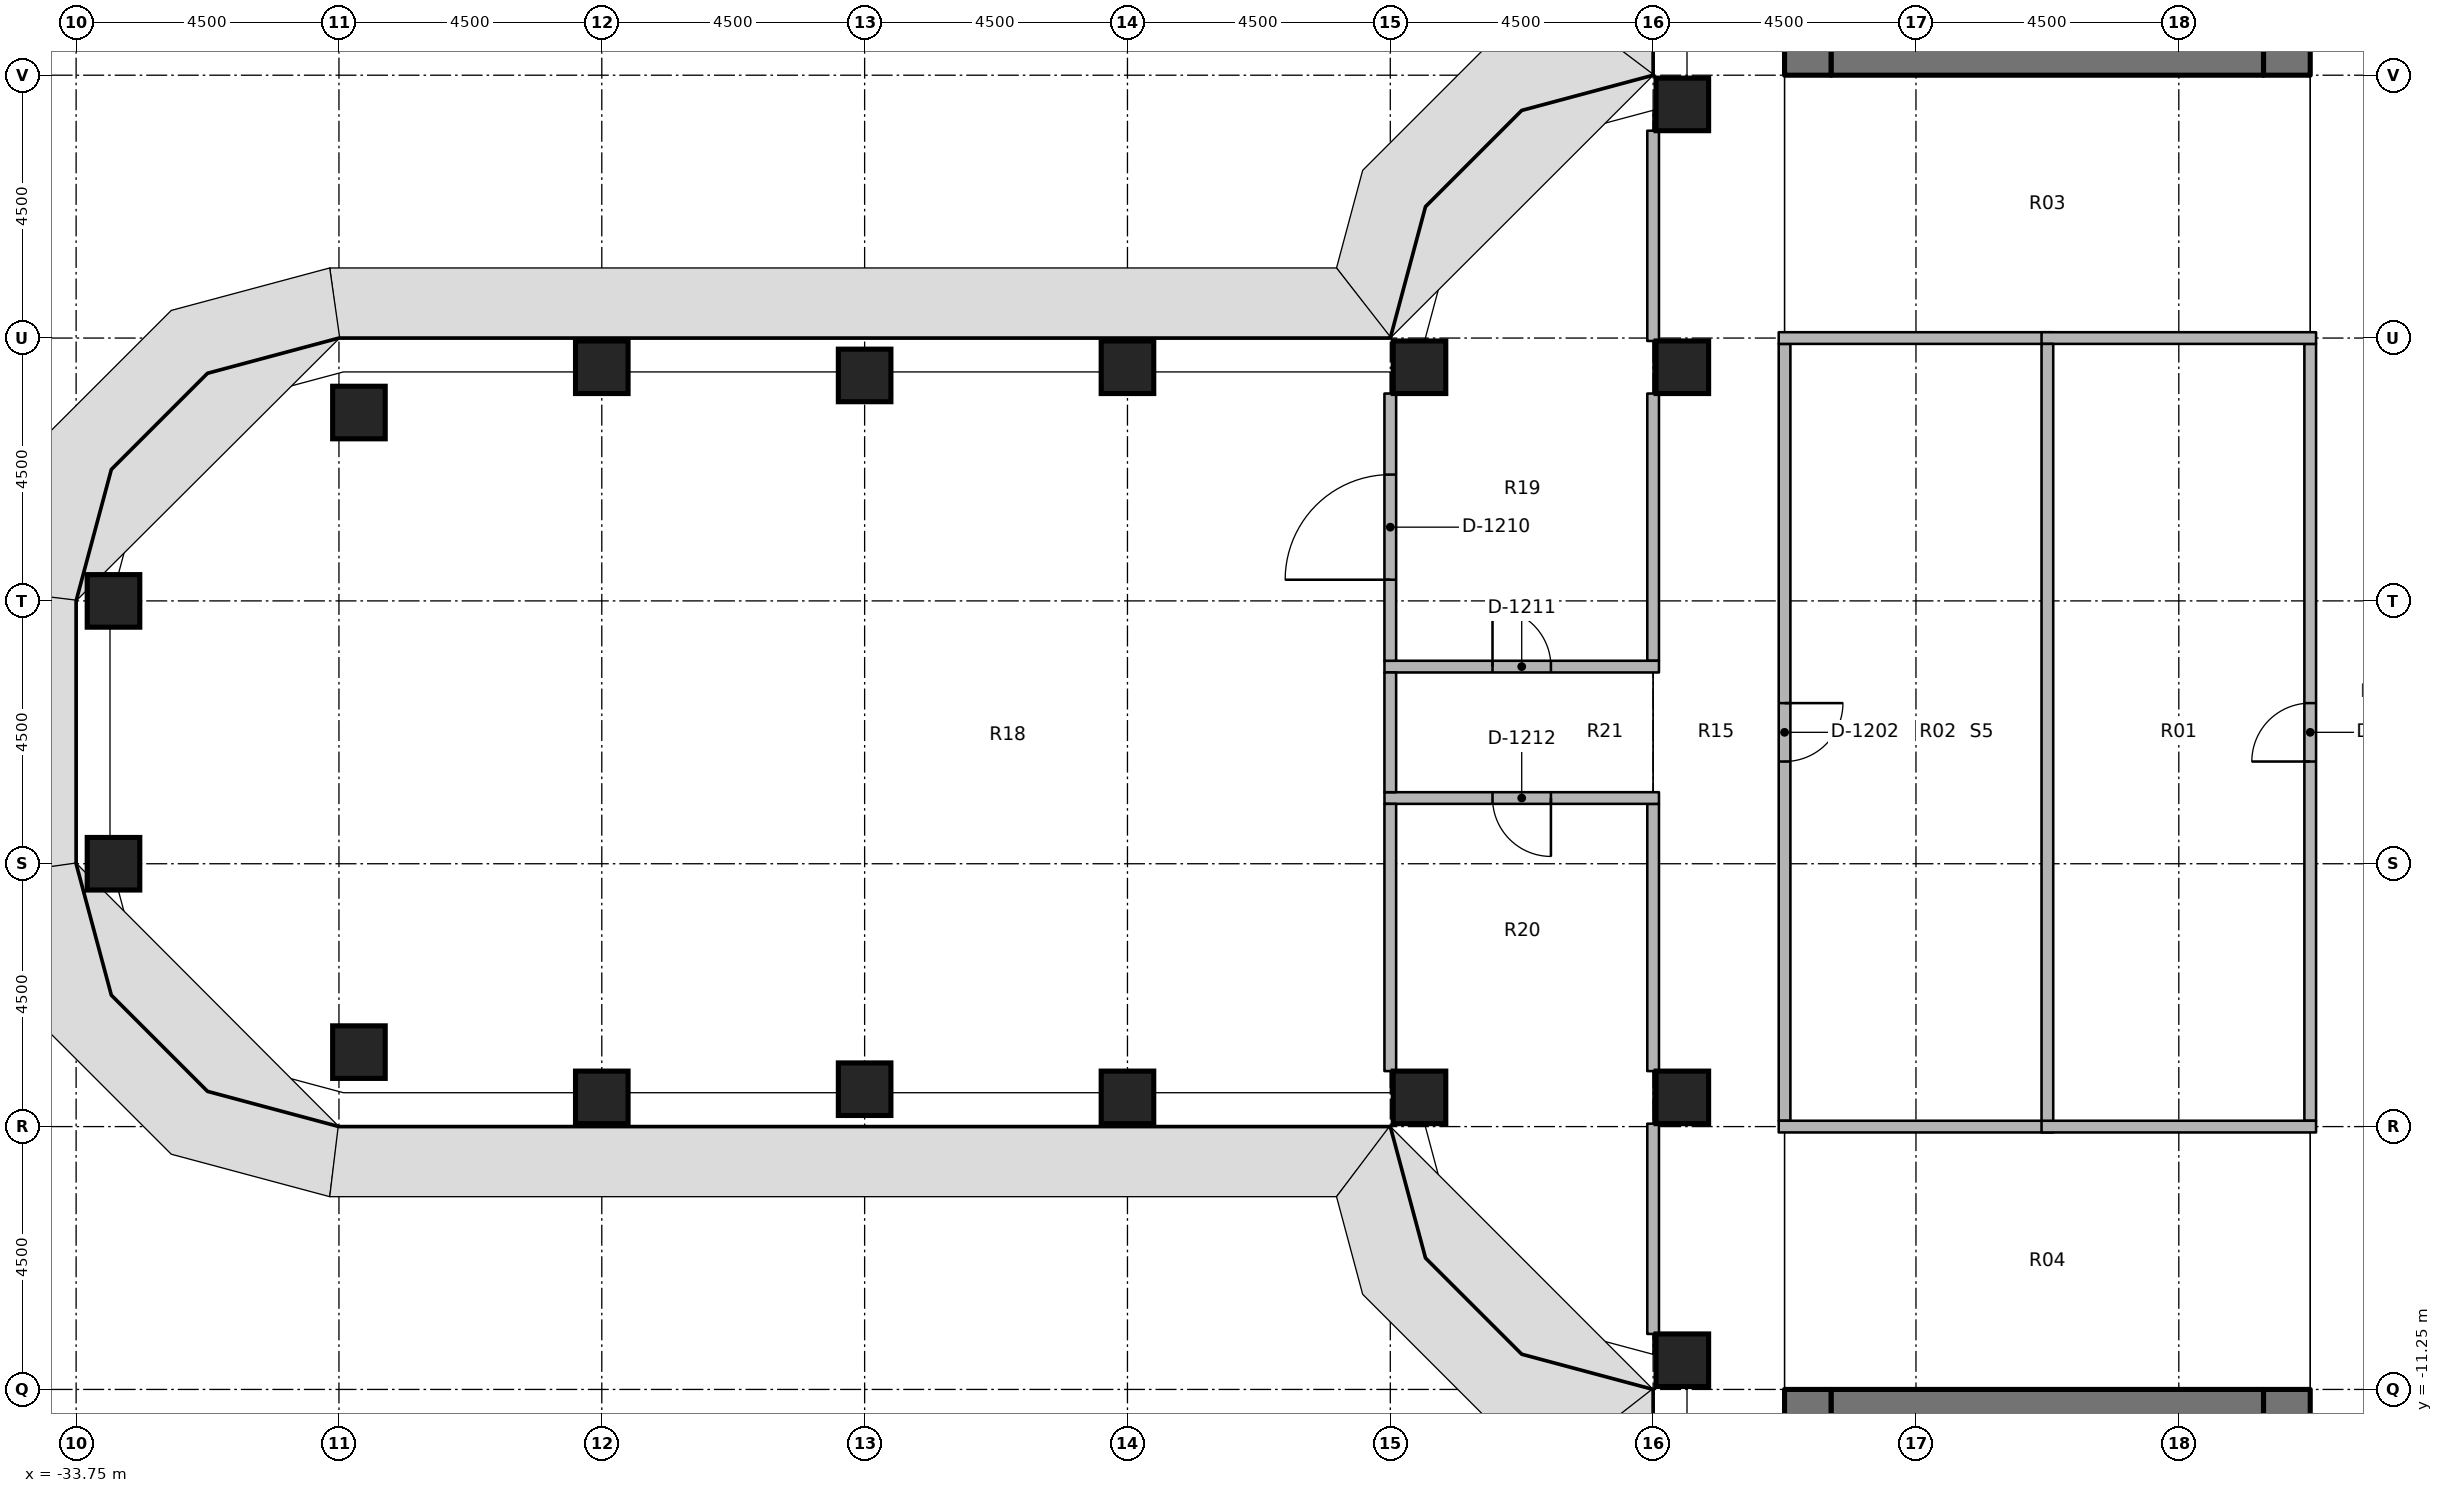
"""IFC4 building model, lengths in metres.
Left out: names, types, materials, properties, quantities, classifications, styles, units other than length and angle.
Written with IfcOpenShell. Run it as: python <this file> out.ifc"""

import sys

from ifc_helpers import new_model, si_unit, direction, frame, frame_2d, origin, origin_2d, place, context, subcontext, project, spatial, rectangle, extrude, element, fill, save


model = new_model("IFC4")
c1 = context("Model", 3, precision=1e-05, world=origin(), true_north=direction((0.0, 1.0)))
c2 = subcontext(c1, "Body", "Model", "MODEL_VIEW")
j1 = project(units=[si_unit("LENGTHUNIT", "METRE"), si_unit("PLANEANGLEUNIT", "RADIAN")], contexts=[c1])
p1 = place(None, origin())
s1 = spatial("IfcSite", under=j1, at=p1, CompositionType="ELEMENT")
p2 = place(p1, origin())
s2 = spatial("IfcBuilding", under=s1, at=p2, CompositionType="ELEMENT")
p3 = place(p2, frame((0.0, 0.0, 128.4)))
s3 = spatial("IfcBuildingStorey", under=s2, at=p3, CompositionType="ELEMENT", Elevation=128.4)
for number, where, z_axis, x_axis in (
    (1, (-33.11, -2.25, 0.0), (0.0, 0.0, 1.0), (1.0, 0.0, 0.0)),
    (2, (-33.11, 2.25, 0.0), (0.0, 0.0, 1.0), (1.0, 0.0, 0.0)),
    (3, (-28.908, -5.475, 0.0), (0.0, 0.0, 1.0), (1.0, 0.0, 0.0)),
    (4, (-28.908, 5.475, 0.0), (0.0, 0.0, 1.0), (1.0, 0.0, 0.0)),
    (5, (-24.75, -6.25, 0.0), (0.0, 0.0, 1.0), (1.0, 0.0, 0.0)),
    (6, (-24.75, 6.25, 0.0), (0.0, 0.0, 1.0), (1.0, 0.0, 0.0)),
    (7, (-20.25, -6.11, 0.0), (0.0, 0.0, 1.0), (1.0, 0.0, 0.0)),
    (8, (-20.25, 6.11, 0.0), (0.0, 0.0, 1.0), (1.0, 0.0, 0.0)),
    (9, (-15.75, -6.25, 0.0), (0.0, 0.0, 1.0), (1.0, 0.0, 0.0)),
    (10, (-15.75, 6.25, 0.0), (0.0, 0.0, 1.0), (1.0, 0.0, 0.0)),
    (11, (-10.75, -6.25, 0.0), (0.0, 0.0, 1.0), (1.0, 0.0, 0.0)),
    (12, (-10.75, 6.25, 0.0), (0.0, 0.0, 1.0), (1.0, 0.0, 0.0)),
    (13, (-6.25, -10.75, 0.0), (0.0, 0.0, 1.0), (1.0, 0.0, 0.0)),
    (14, (-6.25, -6.25, 0.0), (0.0, 0.0, 1.0), (1.0, 0.0, 0.0)),
    (15, (-6.25, 6.25, 0.0), (0.0, 0.0, 1.0), (1.0, 0.0, 0.0)),
    (16, (-6.25, 10.75, 0.0), (0.0, 0.0, 1.0), (1.0, 0.0, 0.0)),
):
    element("IfcColumn", number, at=place(p3, frame(where, z_axis=z_axis, x_axis=x_axis)), inside=s3, PredefinedType="COLUMN", context=c2, shape_type="SweptSolid", body=[
        extrude(rectangle(XDim=0.9, YDim=0.9, at=origin_2d()), origin(), (0.0, 0.0, 1.0), 3.65),
    ])
p4 = place(p3, frame((-4.1, 11.25, 0.0), z_axis=(0.0, 0.0, 1.0), x_axis=(0.0, 1.0, 0.0)))
e17 = element("IfcWall", 17, at=p4, inside=s3, PredefinedType="SHEAR", context=c2, shape_type="SweptSolid", body=[
    extrude(rectangle(XDim=15.0, YDim=0.8, at=frame_2d((7.5, 0.0))), origin(), (0.0, 0.0, 1.0), 3.8),
])
p5 = place(p4, frame((7.15, 0.0, 0.0)))
e18 = element("IfcOpeningElement", 18, at=p5, cuts=e17, PredefinedType="OPENING", context=c2, shape_type="SweptSolid", body=[
    extrude(rectangle(XDim=1.5, YDim=2.3, at=frame_2d((0.75, 1.15))), frame((0.0, 0.41, 0.0), z_axis=(0.0, -1.0, 0.0), x_axis=(1.0, 0.0, 0.0)), (0.0, 0.0, 1.0), 0.82),
])
p6 = place(p4, frame((13.9, 0.0, 0.0)))
e19 = element("IfcOpeningElement", 19, at=p6, cuts=e17, PredefinedType="OPENING", context=c2, shape_type="SweptSolid", body=[
    extrude(rectangle(XDim=0.9, YDim=2.1, at=frame_2d((0.45, 1.05))), frame((0.0, 0.41, 0.0), z_axis=(0.0, -1.0, 0.0), x_axis=(1.0, 0.0, 0.0)), (0.0, 0.0, 1.0), 0.82),
])
p7 = place(p4, frame((1.15, 0.0, 0.0)))
e20 = element("IfcOpeningElement", 20, at=p7, cuts=e17, PredefinedType="OPENING", context=c2, shape_type="SweptSolid", body=[
    extrude(rectangle(XDim=1.2, YDim=2.1, at=frame_2d((0.6, 1.05))), frame((0.0, 0.41, 0.0), z_axis=(0.0, -1.0, 0.0), x_axis=(1.0, 0.0, 0.0)), (0.0, 0.0, 1.0), 0.82),
])
p8 = place(p3, frame((4.1, 11.25, 0.0), z_axis=(0.0, 0.0, 1.0), x_axis=(0.0, 1.0, 0.0)))
e21 = element("IfcWall", 21, at=p8, inside=s3, PredefinedType="SHEAR", context=c2, shape_type="SweptSolid", body=[
    extrude(rectangle(XDim=15.0, YDim=0.8, at=frame_2d((7.5, 0.0))), origin(), (0.0, 0.0, 1.0), 3.8),
])
p9 = place(p8, frame((7.15, 0.0, 0.0)))
e22 = element("IfcOpeningElement", 22, at=p9, cuts=e21, PredefinedType="OPENING", context=c2, shape_type="SweptSolid", body=[
    extrude(rectangle(XDim=1.5, YDim=2.3, at=frame_2d((0.75, 1.15))), frame((0.0, 0.41, 0.0), z_axis=(0.0, -1.0, 0.0), x_axis=(1.0, 0.0, 0.0)), (0.0, 0.0, 1.0), 0.82),
])
p10 = place(p8, frame((5.55, 0.0, 0.0)))
e23 = element("IfcOpeningElement", 23, at=p10, cuts=e21, PredefinedType="OPENING", context=c2, shape_type="SweptSolid", body=[
    extrude(rectangle(XDim=1.2, YDim=2.1, at=frame_2d((0.6, 1.05))), frame((0.0, 0.41, 0.0), z_axis=(0.0, -1.0, 0.0), x_axis=(1.0, 0.0, 0.0)), (0.0, 0.0, 1.0), 0.82),
])
p11 = place(p3, frame((-3.7, 11.65, 0.0), z_axis=(0.0, 0.0, 1.0), x_axis=(1.0, 0.0, 0.0)))
e24 = element("IfcWall", 24, at=p11, inside=s3, PredefinedType="SHEAR", context=c2, shape_type="SweptSolid", body=[
    extrude(rectangle(XDim=7.4, YDim=0.8, at=frame_2d((3.7, 0.0))), origin(), (0.0, 0.0, 1.0), 3.8),
])
p12 = place(p3, frame((-4.1, -11.25, 0.0), z_axis=(0.0, 0.0, 1.0), x_axis=(0.0, -1.0, 0.0)))
e25 = element("IfcWall", 25, at=p12, inside=s3, PredefinedType="SHEAR", context=c2, shape_type="SweptSolid", body=[
    extrude(rectangle(XDim=15.0, YDim=0.8, at=frame_2d((7.5, 0.0))), origin(), (0.0, 0.0, 1.0), 3.8),
])
p13 = place(p12, frame((7.15, 0.0, 0.0)))
e26 = element("IfcOpeningElement", 26, at=p13, cuts=e25, PredefinedType="OPENING", context=c2, shape_type="SweptSolid", body=[
    extrude(rectangle(XDim=1.5, YDim=2.3, at=frame_2d((0.75, 1.15))), frame((0.0, 0.41, 0.0), z_axis=(0.0, -1.0, 0.0), x_axis=(1.0, 0.0, 0.0)), (0.0, 0.0, 1.0), 0.82),
])
p14 = place(p12, frame((5.55, 0.0, 0.0)))
e27 = element("IfcOpeningElement", 27, at=p14, cuts=e25, PredefinedType="OPENING", context=c2, shape_type="SweptSolid", body=[
    extrude(rectangle(XDim=1.2, YDim=2.1, at=frame_2d((0.6, 1.05))), frame((0.0, 0.41, 0.0), z_axis=(0.0, -1.0, 0.0), x_axis=(1.0, 0.0, 0.0)), (0.0, 0.0, 1.0), 0.82),
])
p15 = place(p3, frame((4.1, -11.25, 0.0), z_axis=(0.0, 0.0, 1.0), x_axis=(0.0, -1.0, 0.0)))
e28 = element("IfcWall", 28, at=p15, inside=s3, PredefinedType="SHEAR", context=c2, shape_type="SweptSolid", body=[
    extrude(rectangle(XDim=15.0, YDim=0.8, at=frame_2d((7.5, 0.0))), origin(), (0.0, 0.0, 1.0), 3.8),
])
p16 = place(p15, frame((7.15, 0.0, 0.0)))
e29 = element("IfcOpeningElement", 29, at=p16, cuts=e28, PredefinedType="OPENING", context=c2, shape_type="SweptSolid", body=[
    extrude(rectangle(XDim=1.5, YDim=2.3, at=frame_2d((0.75, 1.15))), frame((0.0, 0.41, 0.0), z_axis=(0.0, -1.0, 0.0), x_axis=(1.0, 0.0, 0.0)), (0.0, 0.0, 1.0), 0.82),
])
p17 = place(p15, frame((13.9, 0.0, 0.0)))
e30 = element("IfcOpeningElement", 30, at=p17, cuts=e28, PredefinedType="OPENING", context=c2, shape_type="SweptSolid", body=[
    extrude(rectangle(XDim=0.9, YDim=2.1, at=frame_2d((0.45, 1.05))), frame((0.0, 0.41, 0.0), z_axis=(0.0, -1.0, 0.0), x_axis=(1.0, 0.0, 0.0)), (0.0, 0.0, 1.0), 0.82),
])
p18 = place(p15, frame((1.15, 0.0, 0.0)))
e31 = element("IfcOpeningElement", 31, at=p18, cuts=e28, PredefinedType="OPENING", context=c2, shape_type="SweptSolid", body=[
    extrude(rectangle(XDim=1.2, YDim=2.1, at=frame_2d((0.6, 1.05))), frame((0.0, 0.41, 0.0), z_axis=(0.0, -1.0, 0.0), x_axis=(1.0, 0.0, 0.0)), (0.0, 0.0, 1.0), 0.82),
])
p19 = place(p3, frame((-3.7, -11.65, 0.0), z_axis=(0.0, 0.0, 1.0), x_axis=(1.0, 0.0, 0.0)))
e32 = element("IfcWall", 32, at=p19, inside=s3, PredefinedType="SHEAR", context=c2, shape_type="SweptSolid", body=[
    extrude(rectangle(XDim=7.4, YDim=0.8, at=frame_2d((3.7, 0.0))), origin(), (0.0, 0.0, 1.0), 3.8),
])
p20 = place(p3, frame((-4.5, 6.65, 0.0), z_axis=(0.0, 0.0, 1.0), x_axis=(0.0, -1.0, 0.0)))
e33 = element("IfcWall", 33, at=p20, inside=s3, PredefinedType="PARTITIONING", context=c2, shape_type="SweptSolid", body=[
    extrude(rectangle(XDim=13.3, YDim=0.2, at=frame_2d((6.65, 0.0))), origin(), (0.0, 0.0, 1.0), 2.738),
])
p21 = place(p20, frame((6.15, 0.0, 0.0)))
e34 = element("IfcOpeningElement", 34, at=p21, cuts=e33, PredefinedType="OPENING", context=c2, shape_type="SweptSolid", body=[
    extrude(rectangle(XDim=1.0, YDim=2.1, at=frame_2d((0.5, 1.05))), frame((0.0, 0.11, 0.0), z_axis=(0.0, -1.0, 0.0), x_axis=(1.0, 0.0, 0.0)), (0.0, 0.0, 1.0), 0.22),
])
p22 = place(p3, frame((-6.75, 1.225, 0.0), z_axis=(0.0, 0.0, 1.0), x_axis=(0.0, 1.0, 0.0)))
e35 = element("IfcWall", 35, at=p22, inside=s3, PredefinedType="PARTITIONING", context=c2, shape_type="SweptSolid", body=[
    extrude(rectangle(XDim=4.575, YDim=0.2, at=frame_2d((2.288, 0.0))), origin(), (0.0, 0.0, 1.0), 2.738),
])
for number, where, z_axis, x_axis in (
    (36, (-6.75, 6.7, 0.0), (0.0, 0.0, 1.0), (0.0, 1.0, 0.0)),
    (37, (-6.75, -10.3, 0.0), (0.0, 0.0, 1.0), (0.0, 1.0, 0.0)),
):
    element("IfcWall", number, at=place(p3, frame(where, z_axis=z_axis, x_axis=x_axis)), inside=s3, PredefinedType="PARTITIONING", context=c2, shape_type="SweptSolid", body=[
        extrude(rectangle(XDim=3.6, YDim=0.2, at=frame_2d((1.8, 0.0))), origin(), (0.0, 0.0, 1.0), 2.738),
    ])
p23 = place(p3, frame((-6.75, -5.8, 0.0), z_axis=(0.0, 0.0, 1.0), x_axis=(0.0, 1.0, 0.0)))
e38 = element("IfcWall", 38, at=p23, inside=s3, PredefinedType="PARTITIONING", context=c2, shape_type="SweptSolid", body=[
    extrude(rectangle(XDim=4.575, YDim=0.2, at=frame_2d((2.288, 0.0))), origin(), (0.0, 0.0, 1.0), 2.738),
])
p24 = place(p3, frame((4.5, -6.65, 0.0), z_axis=(0.0, 0.0, 1.0), x_axis=(0.0, 1.0, 0.0)))
e39 = element("IfcWall", 39, at=p24, inside=s3, PredefinedType="PARTITIONING", context=c2, shape_type="SweptSolid", body=[
    extrude(rectangle(XDim=13.3, YDim=0.2, at=frame_2d((6.65, 0.0))), origin(), (0.0, 0.0, 1.0), 2.738),
])
p25 = place(p24, frame((6.15, 0.0, 0.0)))
e40 = element("IfcOpeningElement", 40, at=p25, cuts=e39, PredefinedType="OPENING", context=c2, shape_type="SweptSolid", body=[
    extrude(rectangle(XDim=1.0, YDim=2.1, at=frame_2d((0.5, 1.05))), frame((0.0, 0.11, 0.0), z_axis=(0.0, -1.0, 0.0), x_axis=(1.0, 0.0, 0.0)), (0.0, 0.0, 1.0), 0.22),
])
for number, where, z_axis, x_axis in (
    (41, (-4.6, 6.75, 0.0), (0.0, 0.0, 1.0), (1.0, 0.0, 0.0)),
    (42, (-0.1, 6.75, 0.0), (0.0, 0.0, 1.0), (1.0, 0.0, 0.0)),
    (43, (-4.6, -6.75, 0.0), (0.0, 0.0, 1.0), (1.0, 0.0, 0.0)),
    (44, (-0.1, -6.75, 0.0), (0.0, 0.0, 1.0), (1.0, 0.0, 0.0)),
):
    element("IfcWall", number, at=place(p3, frame(where, z_axis=z_axis, x_axis=x_axis)), inside=s3, PredefinedType="PARTITIONING", context=c2, shape_type="SweptSolid", body=[
        extrude(rectangle(XDim=4.7, YDim=0.2, at=frame_2d((2.35, 0.0))), origin(), (0.0, 0.0, 1.0), 2.738),
    ])
p26 = place(p3, frame((0.0, -6.65, 0.0), z_axis=(0.0, 0.0, 1.0), x_axis=(0.0, 1.0, 0.0)))
e45 = element("IfcWall", 45, at=p26, inside=s3, PredefinedType="PARTITIONING", context=c2, shape_type="SweptSolid", body=[
    extrude(rectangle(XDim=13.3, YDim=0.2, at=frame_2d((6.65, 0.0))), origin(), (0.0, 0.0, 1.0), 2.738),
])
p27 = place(p3, frame((-11.35, 1.125, 0.0), z_axis=(0.0, 0.0, 1.0), x_axis=(1.0, 0.0, 0.0)))
e46 = element("IfcWall", 46, at=p27, inside=s3, PredefinedType="PARTITIONING", context=c2, shape_type="SweptSolid", body=[
    extrude(rectangle(XDim=4.7, YDim=0.2, at=frame_2d((2.35, 0.0))), origin(), (0.0, 0.0, 1.0), 2.738),
])
p28 = place(p27, frame((1.85, 0.0, 0.0)))
e47 = element("IfcOpeningElement", 47, at=p28, cuts=e46, PredefinedType="OPENING", context=c2, shape_type="SweptSolid", body=[
    extrude(rectangle(XDim=1.0, YDim=2.1, at=frame_2d((0.5, 1.05))), frame((0.0, 0.11, 0.0), z_axis=(0.0, -1.0, 0.0), x_axis=(1.0, 0.0, 0.0)), (0.0, 0.0, 1.0), 0.22),
])
p29 = place(p3, frame((-6.65, -1.125, 0.0), z_axis=(0.0, 0.0, 1.0), x_axis=(-1.0, 0.0, 0.0)))
e48 = element("IfcWall", 48, at=p29, inside=s3, PredefinedType="PARTITIONING", context=c2, shape_type="SweptSolid", body=[
    extrude(rectangle(XDim=4.7, YDim=0.2, at=frame_2d((2.35, 0.0))), origin(), (0.0, 0.0, 1.0), 2.738),
])
p30 = place(p29, frame((1.85, 0.0, 0.0)))
e49 = element("IfcOpeningElement", 49, at=p30, cuts=e48, PredefinedType="OPENING", context=c2, shape_type="SweptSolid", body=[
    extrude(rectangle(XDim=1.0, YDim=2.1, at=frame_2d((0.5, 1.05))), frame((0.0, 0.11, 0.0), z_axis=(0.0, -1.0, 0.0), x_axis=(1.0, 0.0, 0.0)), (0.0, 0.0, 1.0), 0.22),
])
p31 = place(p3, frame((-11.25, -1.025, 0.0), z_axis=(0.0, 0.0, 1.0), x_axis=(0.0, 1.0, 0.0)))
e50 = element("IfcWall", 50, at=p31, inside=s3, PredefinedType="PARTITIONING", context=c2, shape_type="SweptSolid", body=[
    extrude(rectangle(XDim=2.05, YDim=0.2, at=frame_2d((1.025, 0.0))), origin(), (0.0, 0.0, 1.0), 2.738),
])
p32 = place(p3, frame((-11.25, 1.225, 0.0), z_axis=(0.0, 0.0, 1.0), x_axis=(0.0, 1.0, 0.0)))
e51 = element("IfcWall", 51, at=p32, inside=s3, PredefinedType="PARTITIONING", context=c2, shape_type="SweptSolid", body=[
    extrude(rectangle(XDim=4.575, YDim=0.2, at=frame_2d((2.288, 0.0))), origin(), (0.0, 0.0, 1.0), 2.738),
])
p33 = place(p32, frame((1.387, 0.0, 0.0)))
e52 = element("IfcOpeningElement", 52, at=p33, cuts=e51, PredefinedType="OPENING", context=c2, shape_type="SweptSolid", body=[
    extrude(rectangle(XDim=1.8, YDim=2.1, at=frame_2d((0.9, 1.05))), frame((0.0, 0.11, 0.0), z_axis=(0.0, -1.0, 0.0), x_axis=(1.0, 0.0, 0.0)), (0.0, 0.0, 1.0), 0.22),
])
p34 = place(p3, frame((-11.25, -5.8, 0.0), z_axis=(0.0, 0.0, 1.0), x_axis=(0.0, 1.0, 0.0)))
e53 = element("IfcWall", 53, at=p34, inside=s3, PredefinedType="PARTITIONING", context=c2, shape_type="SweptSolid", body=[
    extrude(rectangle(XDim=4.575, YDim=0.2, at=frame_2d((2.288, 0.0))), origin(), (0.0, 0.0, 1.0), 2.738),
])
p35 = place(p25, origin())
e54 = element("IfcDoor", 54, at=p35, inside=s3, OperationType="SINGLE_SWING_RIGHT", PredefinedType="DOOR", context=c2, shape_type="SweptSolid", body=[
    extrude(rectangle(XDim=1.0, YDim=2.1, at=frame_2d((0.5, 1.05))), frame((0.0, 0.025, 0.0), z_axis=(0.0, -1.0, 0.0), x_axis=(1.0, 0.0, 0.0)), (0.0, 0.0, 1.0), 0.05),
])
fill(e40, e54)
p36 = place(p21, origin())
e55 = element("IfcDoor", 55, at=p36, inside=s3, OperationType="SINGLE_SWING_RIGHT", PredefinedType="DOOR", context=c2, shape_type="SweptSolid", body=[
    extrude(rectangle(XDim=1.0, YDim=2.1, at=frame_2d((0.5, 1.05))), frame((0.0, 0.025, 0.0), z_axis=(0.0, -1.0, 0.0), x_axis=(1.0, 0.0, 0.0)), (0.0, 0.0, 1.0), 0.05),
])
fill(e34, e55)
p37 = place(p33, origin())
e56 = element("IfcDoor", 56, at=p37, inside=s3, OperationType="DOUBLE_DOOR_SINGLE_SWING", PredefinedType="DOOR", context=c2, shape_type="SweptSolid", body=[
    extrude(rectangle(XDim=1.8, YDim=2.1, at=frame_2d((0.9, 1.05))), frame((0.0, 0.025, 0.0), z_axis=(0.0, -1.0, 0.0), x_axis=(1.0, 0.0, 0.0)), (0.0, 0.0, 1.0), 0.05),
])
fill(e52, e56)
p38 = place(p28, origin())
e57 = element("IfcDoor", 57, at=p38, inside=s3, OperationType="SINGLE_SWING_RIGHT", PredefinedType="DOOR", context=c2, shape_type="SweptSolid", body=[
    extrude(rectangle(XDim=1.0, YDim=2.1, at=frame_2d((0.5, 1.05))), frame((0.0, 0.025, 0.0), z_axis=(0.0, -1.0, 0.0), x_axis=(1.0, 0.0, 0.0)), (0.0, 0.0, 1.0), 0.05),
])
fill(e47, e57)
p39 = place(p30, origin())
e58 = element("IfcDoor", 58, at=p39, inside=s3, OperationType="SINGLE_SWING_RIGHT", PredefinedType="DOOR", context=c2, shape_type="SweptSolid", body=[
    extrude(rectangle(XDim=1.0, YDim=2.1, at=frame_2d((0.5, 1.05))), frame((0.0, 0.025, 0.0), z_axis=(0.0, -1.0, 0.0), x_axis=(1.0, 0.0, 0.0)), (0.0, 0.0, 1.0), 0.05),
])
fill(e49, e58)
save(model, sys.argv[1])
